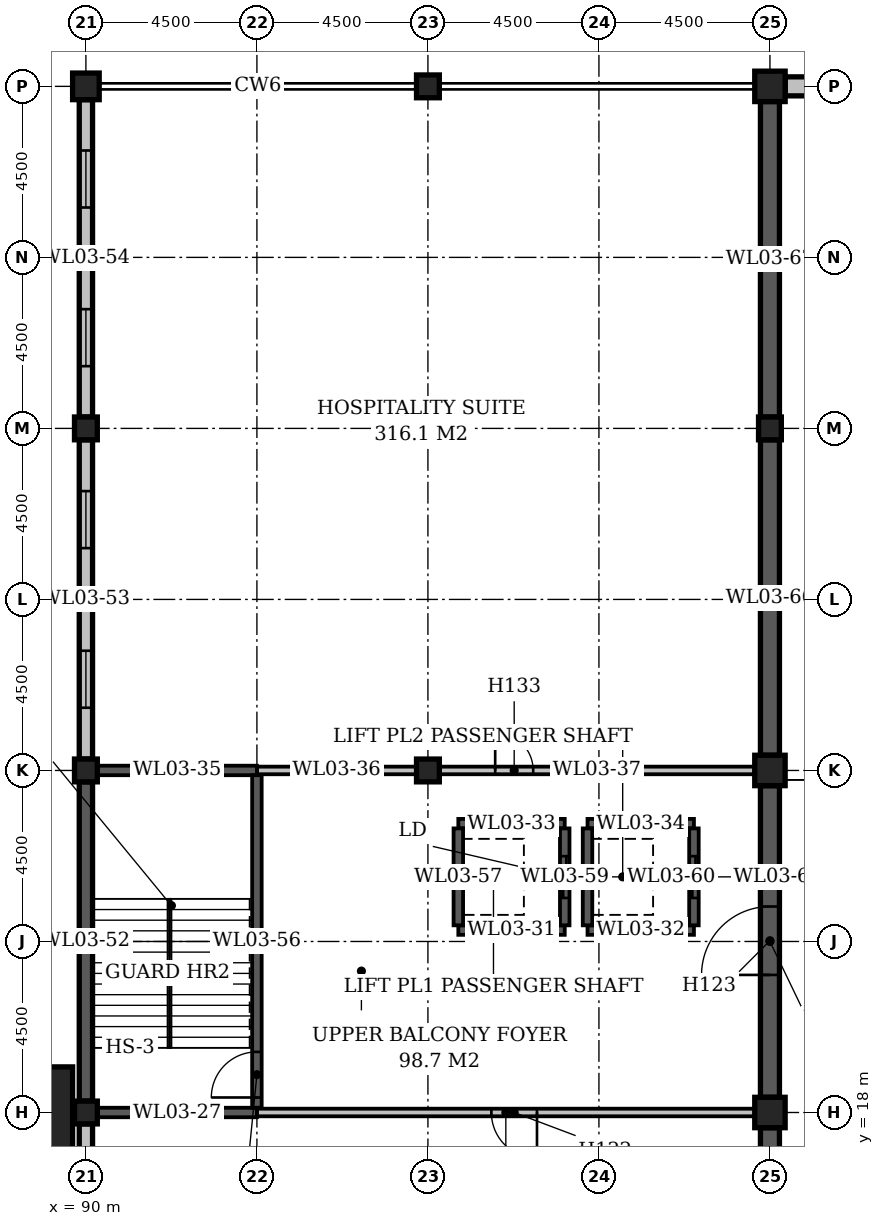
"""IFC4 building model, lengths in metres.
Left out: names, types, materials, properties, quantities, classifications, styles, units other than length and angle.
Written with IfcOpenShell. Run it as: python <this file> out.ifc"""

import sys

from ifc_helpers import new_model, si_unit, direction, frame, frame_2d, origin, origin_2d, place, context, subcontext, project, spatial, rectangle, extrude, element, fill, save


model = new_model("IFC4")
c1 = context("Model", 3, precision=1e-05, world=origin(), true_north=direction((0.0, 1.0)))
c2 = subcontext(c1, "Body", "Model", "MODEL_VIEW")
j1 = project(units=[si_unit("LENGTHUNIT", "METRE"), si_unit("PLANEANGLEUNIT", "RADIAN")], contexts=[c1])
p1 = place(None, origin())
s1 = spatial("IfcSite", under=j1, at=p1, CompositionType="ELEMENT")
p2 = place(p1, origin())
s2 = spatial("IfcBuilding", under=s1, at=p2, CompositionType="ELEMENT")
p3 = place(p2, frame((0.0, 0.0, 19.0)))
s3 = spatial("IfcBuildingStorey", under=s2, at=p3, CompositionType="ELEMENT", Elevation=19.0)
for number, where, z_axis, x_axis in (
    (1, (90.0, 18.0, 0.0), (0.0, 0.0, 1.0), (1.0, 0.0, 0.0)),
    (2, (90.0, 27.0, 0.0), (0.0, 0.0, 1.0), (1.0, 0.0, 0.0)),
    (3, (90.0, 36.0, 0.0), (0.0, 0.0, 1.0), (1.0, 0.0, 0.0)),
):
    element("IfcColumn", number, at=place(p3, frame(where, z_axis=z_axis, x_axis=x_axis)), inside=s3, PredefinedType="COLUMN", context=c2, shape_type="SweptSolid", body=[
        extrude(rectangle(XDim=0.6, YDim=0.6, at=origin_2d()), origin(), (0.0, 0.0, 1.0), 4.7),
    ])
p4 = place(p3, frame((90.0, 45.0, 0.0), z_axis=(0.0, 0.0, 1.0), x_axis=(1.0, 0.0, 0.0)))
e4 = element("IfcColumn", 4, at=p4, inside=s3, PredefinedType="COLUMN", context=c2, shape_type="SweptSolid", body=[
    extrude(rectangle(XDim=0.7, YDim=0.7, at=origin_2d()), origin(), (0.0, 0.0, 1.0), 4.7),
])
for number, where, z_axis, x_axis in (
    (5, (99.0, 27.0, 0.0), (0.0, 0.0, 1.0), (1.0, 0.0, 0.0)),
    (6, (99.0, 45.0, 0.0), (0.0, 0.0, 1.0), (1.0, 0.0, 0.0)),
):
    element("IfcColumn", number, at=place(p3, frame(where, z_axis=z_axis, x_axis=x_axis)), inside=s3, PredefinedType="COLUMN", context=c2, shape_type="SweptSolid", body=[
        extrude(rectangle(XDim=0.6, YDim=0.6, at=origin_2d()), origin(), (0.0, 0.0, 1.0), 4.7),
    ])
for number, where, z_axis, x_axis in (
    (7, (108.0, 18.0, -0.3), (0.0, 0.0, 1.0), (1.0, 0.0, 0.0)),
    (8, (108.0, 27.0, -0.3), (0.0, 0.0, 1.0), (1.0, 0.0, 0.0)),
):
    element("IfcColumn", number, at=place(p3, frame(where, z_axis=z_axis, x_axis=x_axis)), inside=s3, PredefinedType="COLUMN", context=c2, shape_type="SweptSolid", body=[
        extrude(rectangle(XDim=0.8, YDim=0.8, at=origin_2d()), origin(), (0.0, 0.0, 1.0), 5.0),
    ])
p5 = place(p3, frame((108.0, 36.0, -0.3), z_axis=(0.0, 0.0, 1.0), x_axis=(1.0, 0.0, 0.0)))
e9 = element("IfcColumn", 9, at=p5, inside=s3, PredefinedType="COLUMN", context=c2, shape_type="SweptSolid", body=[
    extrude(rectangle(XDim=0.6, YDim=0.6, at=origin_2d()), origin(), (0.0, 0.0, 1.0), 5.0),
])
p6 = place(p3, frame((108.0, 45.0, -0.3), z_axis=(0.0, 0.0, 1.0), x_axis=(1.0, 0.0, 0.0)))
e10 = element("IfcColumn", 10, at=p6, inside=s3, PredefinedType="COLUMN", context=c2, shape_type="SweptSolid", body=[
    extrude(rectangle(XDim=0.8, YDim=0.8, at=origin_2d()), origin(), (0.0, 0.0, 1.0), 5.0),
])
p7 = place(p3, frame((90.3, 18.0, 0.0), z_axis=(0.0, 0.0, 1.0), x_axis=(1.0, 0.0, 0.0)))
e11 = element("IfcWall", 11, at=p7, inside=s3, PredefinedType="STANDARD", context=c2, shape_type="SweptSolid", body=[
    extrude(rectangle(XDim=4.2, YDim=0.25, at=frame_2d((2.1, 0.0))), origin(), (0.0, 0.0, 1.0), 5.0),
])
p8 = place(p3, frame((94.5, 18.0, 0.0), z_axis=(0.0, 0.0, 1.0), x_axis=(1.0, 0.0, 0.0)))
e12 = element("IfcWall", 12, at=p8, inside=s3, PredefinedType="STANDARD", context=c2, shape_type="SweptSolid", body=[
    extrude(rectangle(XDim=13.1, YDim=0.2, at=frame_2d((6.55, 0.0))), origin(), (0.0, 0.0, 1.0), 3.3),
])
p9 = place(p8, frame((6.17, 0.0, 0.0)))
e13 = element("IfcOpeningElement", 13, at=p9, cuts=e12, PredefinedType="OPENING", context=c2, shape_type="SweptSolid", body=[
    extrude(rectangle(XDim=1.2, YDim=2.1, at=frame_2d((0.6, 1.05))), frame((0.0, 0.112, 0.0), z_axis=(0.0, -1.0, 0.0), x_axis=(1.0, 0.0, 0.0)), (0.0, 0.0, 1.0), 0.224),
])
for number, where, z_axis, x_axis in (
    (14, (99.8, 22.8, 0.0), (0.0, 0.0, 1.0), (1.0, 0.0, 0.0)),
    (15, (103.2, 22.8, 0.0), (0.0, 0.0, 1.0), (1.0, 0.0, 0.0)),
    (16, (99.8, 25.6, 0.0), (0.0, 0.0, 1.0), (1.0, 0.0, 0.0)),
    (17, (103.2, 25.6, 0.0), (0.0, 0.0, 1.0), (1.0, 0.0, 0.0)),
):
    element("IfcWall", number, at=place(p3, frame(where, z_axis=z_axis, x_axis=x_axis)), inside=s3, PredefinedType="STANDARD", context=c2, shape_type="SweptSolid", body=[
        extrude(rectangle(XDim=2.8, YDim=0.25, at=frame_2d((1.4, 0.0))), origin(), (0.0, 0.0, 1.0), 5.0),
    ])
p10 = place(p3, frame((90.3, 27.0, 0.0), z_axis=(0.0, 0.0, 1.0), x_axis=(1.0, 0.0, 0.0)))
e18 = element("IfcWall", 18, at=p10, inside=s3, PredefinedType="STANDARD", context=c2, shape_type="SweptSolid", body=[
    extrude(rectangle(XDim=4.2, YDim=0.25, at=frame_2d((2.1, 0.0))), origin(), (0.0, 0.0, 1.0), 5.0),
])
p11 = place(p3, frame((94.5, 27.0, 0.0), z_axis=(0.0, 0.0, 1.0), x_axis=(1.0, 0.0, 0.0)))
e19 = element("IfcWall", 19, at=p11, inside=s3, PredefinedType="STANDARD", context=c2, shape_type="SweptSolid", body=[
    extrude(rectangle(XDim=4.2, YDim=0.2, at=frame_2d((2.1, 0.0))), origin(), (0.0, 0.0, 1.0), 4.7),
])
p12 = place(p3, frame((99.3, 27.0, 0.0), z_axis=(0.0, 0.0, 1.0), x_axis=(1.0, 0.0, 0.0)))
e20 = element("IfcWall", 20, at=p12, inside=s3, PredefinedType="STANDARD", context=c2, shape_type="SweptSolid", body=[
    extrude(rectangle(XDim=8.3, YDim=0.2, at=frame_2d((4.15, 0.0))), origin(), (0.0, 0.0, 1.0), 4.7),
])
p13 = place(p12, frame((1.47, 0.0, 0.0)))
e21 = element("IfcOpeningElement", 21, at=p13, cuts=e20, PredefinedType="OPENING", context=c2, shape_type="SweptSolid", body=[
    extrude(rectangle(XDim=1.0, YDim=2.1, at=frame_2d((0.5, 1.05))), frame((0.0, 0.112, 0.0), z_axis=(0.0, -1.0, 0.0), x_axis=(1.0, 0.0, 0.0)), (0.0, 0.0, 1.0), 0.224),
])
p14 = place(p3, frame((108.4, 45.0, 0.0), z_axis=(0.0, 0.0, 1.0), x_axis=(1.0, 0.0, 0.0)))
e22 = element("IfcWall", 22, at=p14, inside=s3, PredefinedType="STANDARD", context=c2, shape_type="SweptSolid", body=[
    extrude(rectangle(XDim=8.3, YDim=0.5, at=frame_2d((4.15, 0.0))), origin(), (0.0, 0.0, 1.0), 5.0),
])
p15 = place(p3, frame((90.0, 9.3, 0.0), z_axis=(0.0, 0.0, 1.0), x_axis=(0.0, 1.0, 0.0)))
e23 = element("IfcWall", 23, at=p15, inside=s3, PredefinedType="STANDARD", context=c2, shape_type="SweptSolid", body=[
    extrude(rectangle(XDim=8.4, YDim=0.35, at=frame_2d((4.2, 0.0))), origin(), (0.0, 0.0, 1.0), 4.1),
])
p16 = place(p15, frame((1.35, 0.0, 1.0)))
e24 = element("IfcOpeningElement", 24, at=p16, cuts=e23, PredefinedType="OPENING", context=c2, shape_type="SweptSolid", body=[
    extrude(rectangle(XDim=1.5, YDim=2.4, at=frame_2d((0.75, 1.2))), frame((0.0, 0.187, 0.0), z_axis=(0.0, -1.0, 0.0), x_axis=(1.0, 0.0, 0.0)), (0.0, 0.0, 1.0), 0.374),
])
p17 = place(p15, frame((5.55, 0.0, 1.0)))
e25 = element("IfcOpeningElement", 25, at=p17, cuts=e23, PredefinedType="OPENING", context=c2, shape_type="SweptSolid", body=[
    extrude(rectangle(XDim=1.5, YDim=2.4, at=frame_2d((0.75, 1.2))), frame((0.0, 0.187, 0.0), z_axis=(0.0, -1.0, 0.0), x_axis=(1.0, 0.0, 0.0)), (0.0, 0.0, 1.0), 0.374),
])
p18 = place(p3, frame((90.0, 18.3, 0.0), z_axis=(0.0, 0.0, 1.0), x_axis=(0.0, 1.0, 0.0)))
e26 = element("IfcWall", 26, at=p18, inside=s3, PredefinedType="STANDARD", context=c2, shape_type="SweptSolid", body=[
    extrude(rectangle(XDim=8.4, YDim=0.35, at=frame_2d((4.2, 0.0))), origin(), (0.0, 0.0, 1.0), 5.0),
])
p19 = place(p3, frame((90.0, 27.3, 0.0), z_axis=(0.0, 0.0, 1.0), x_axis=(0.0, 1.0, 0.0)))
e27 = element("IfcWall", 27, at=p19, inside=s3, PredefinedType="STANDARD", context=c2, shape_type="SweptSolid", body=[
    extrude(rectangle(XDim=8.4, YDim=0.35, at=frame_2d((4.2, 0.0))), origin(), (0.0, 0.0, 1.0), 4.1),
])
p20 = place(p19, frame((1.35, 0.0, 1.0)))
e28 = element("IfcOpeningElement", 28, at=p20, cuts=e27, PredefinedType="OPENING", context=c2, shape_type="SweptSolid", body=[
    extrude(rectangle(XDim=1.5, YDim=2.4, at=frame_2d((0.75, 1.2))), frame((0.0, 0.187, 0.0), z_axis=(0.0, -1.0, 0.0), x_axis=(1.0, 0.0, 0.0)), (0.0, 0.0, 1.0), 0.374),
])
p21 = place(p19, frame((5.55, 0.0, 1.0)))
e29 = element("IfcOpeningElement", 29, at=p21, cuts=e27, PredefinedType="OPENING", context=c2, shape_type="SweptSolid", body=[
    extrude(rectangle(XDim=1.5, YDim=2.4, at=frame_2d((0.75, 1.2))), frame((0.0, 0.187, 0.0), z_axis=(0.0, -1.0, 0.0), x_axis=(1.0, 0.0, 0.0)), (0.0, 0.0, 1.0), 0.374),
])
p22 = place(p3, frame((90.0, 36.3, 0.0), z_axis=(0.0, 0.0, 1.0), x_axis=(0.0, 1.0, 0.0)))
e30 = element("IfcWall", 30, at=p22, inside=s3, PredefinedType="STANDARD", context=c2, shape_type="SweptSolid", body=[
    extrude(rectangle(XDim=8.35, YDim=0.35, at=frame_2d((4.175, 0.0))), origin(), (0.0, 0.0, 1.0), 4.1),
])
p23 = place(p22, frame((1.337, 0.0, 1.0)))
e31 = element("IfcOpeningElement", 31, at=p23, cuts=e30, PredefinedType="OPENING", context=c2, shape_type="SweptSolid", body=[
    extrude(rectangle(XDim=1.5, YDim=2.4, at=frame_2d((0.75, 1.2))), frame((0.0, 0.187, 0.0), z_axis=(0.0, -1.0, 0.0), x_axis=(1.0, 0.0, 0.0)), (0.0, 0.0, 1.0), 0.374),
])
p24 = place(p22, frame((5.512, 0.0, 1.0)))
e32 = element("IfcOpeningElement", 32, at=p24, cuts=e30, PredefinedType="OPENING", context=c2, shape_type="SweptSolid", body=[
    extrude(rectangle(XDim=1.5, YDim=2.4, at=frame_2d((0.75, 1.2))), frame((0.0, 0.187, 0.0), z_axis=(0.0, -1.0, 0.0), x_axis=(1.0, 0.0, 0.0)), (0.0, 0.0, 1.0), 0.374),
])
p25 = place(p3, frame((94.5, 18.125, 0.0), z_axis=(0.0, 0.0, 1.0), x_axis=(0.0, 1.0, 0.0)))
e33 = element("IfcWall", 33, at=p25, inside=s3, PredefinedType="STANDARD", context=c2, shape_type="SweptSolid", body=[
    extrude(rectangle(XDim=8.75, YDim=0.25, at=frame_2d((4.375, 0.0))), origin(), (0.0, 0.0, 1.0), 5.0),
])
p26 = place(p25, frame((0.27, 0.0, 0.0)))
e34 = element("IfcOpeningElement", 34, at=p26, cuts=e33, PredefinedType="OPENING", context=c2, shape_type="SweptSolid", body=[
    extrude(rectangle(XDim=1.2, YDim=2.1, at=frame_2d((0.6, 1.05))), frame((0.0, 0.137, 0.0), z_axis=(0.0, -1.0, 0.0), x_axis=(1.0, 0.0, 0.0)), (0.0, 0.0, 1.0), 0.274),
])
p27 = place(p3, frame((99.8, 22.925, 0.0), z_axis=(0.0, 0.0, 1.0), x_axis=(0.0, 1.0, 0.0)))
e35 = element("IfcWall", 35, at=p27, inside=s3, PredefinedType="STANDARD", context=c2, shape_type="SweptSolid", body=[
    extrude(rectangle(XDim=2.55, YDim=0.25, at=frame_2d((1.275, 0.0))), origin(), (0.0, 0.0, 1.0), 5.0),
])
p28 = place(p3, frame((102.6, 22.925, 0.0), z_axis=(0.0, 0.0, 1.0), x_axis=(0.0, 1.0, 0.0)))
e36 = element("IfcWall", 36, at=p28, inside=s3, PredefinedType="STANDARD", context=c2, shape_type="SweptSolid", body=[
    extrude(rectangle(XDim=2.55, YDim=0.25, at=frame_2d((1.275, 0.0))), origin(), (0.0, 0.0, 1.0), 5.0),
])
p29 = place(p28, frame((0.72, 0.0, 0.0)))
e37 = element("IfcOpeningElement", 37, at=p29, cuts=e36, PredefinedType="OPENING", context=c2, shape_type="SweptSolid", body=[
    extrude(rectangle(XDim=1.1, YDim=2.1, at=frame_2d((0.55, 1.05))), frame((0.0, 0.137, 0.0), z_axis=(0.0, -1.0, 0.0), x_axis=(1.0, 0.0, 0.0)), (0.0, 0.0, 1.0), 0.274),
])
p30 = place(p3, frame((103.2, 22.925, 0.0), z_axis=(0.0, 0.0, 1.0), x_axis=(0.0, 1.0, 0.0)))
e38 = element("IfcWall", 38, at=p30, inside=s3, PredefinedType="STANDARD", context=c2, shape_type="SweptSolid", body=[
    extrude(rectangle(XDim=2.55, YDim=0.25, at=frame_2d((1.275, 0.0))), origin(), (0.0, 0.0, 1.0), 5.0),
])
p31 = place(p3, frame((106.0, 22.925, 0.0), z_axis=(0.0, 0.0, 1.0), x_axis=(0.0, 1.0, 0.0)))
e39 = element("IfcWall", 39, at=p31, inside=s3, PredefinedType="STANDARD", context=c2, shape_type="SweptSolid", body=[
    extrude(rectangle(XDim=2.55, YDim=0.25, at=frame_2d((1.275, 0.0))), origin(), (0.0, 0.0, 1.0), 5.0),
])
p32 = place(p31, frame((0.72, 0.0, 0.0)))
e40 = element("IfcOpeningElement", 40, at=p32, cuts=e39, PredefinedType="OPENING", context=c2, shape_type="SweptSolid", body=[
    extrude(rectangle(XDim=1.1, YDim=2.1, at=frame_2d((0.55, 1.05))), frame((0.0, 0.137, 0.0), z_axis=(0.0, -1.0, 0.0), x_axis=(1.0, 0.0, 0.0)), (0.0, 0.0, 1.0), 0.274),
])
p33 = place(p3, frame((108.0, 9.4, 0.0), z_axis=(0.0, 0.0, 1.0), x_axis=(0.0, 1.0, 0.0)))
e41 = element("IfcWall", 41, at=p33, inside=s3, PredefinedType="STANDARD", context=c2, shape_type="SweptSolid", body=[
    extrude(rectangle(XDim=8.2, YDim=0.5, at=frame_2d((4.1, 0.0))), origin(), (0.0, 0.0, 1.0), 5.0),
])
p34 = place(p3, frame((108.0, 18.4, 0.0), z_axis=(0.0, 0.0, 1.0), x_axis=(0.0, 1.0, 0.0)))
e42 = element("IfcWall", 42, at=p34, inside=s3, PredefinedType="STANDARD", context=c2, shape_type="SweptSolid", body=[
    extrude(rectangle(XDim=8.2, YDim=0.5, at=frame_2d((4.1, 0.0))), origin(), (0.0, 0.0, 1.0), 5.0),
])
p35 = place(p34, frame((3.22, 0.0, 0.0)))
e43 = element("IfcOpeningElement", 43, at=p35, cuts=e42, PredefinedType="OPENING", context=c2, shape_type="SweptSolid", body=[
    extrude(rectangle(XDim=1.8, YDim=2.4, at=frame_2d((0.9, 1.2))), frame((0.0, 0.262, 0.0), z_axis=(0.0, -1.0, 0.0), x_axis=(1.0, 0.0, 0.0)), (0.0, 0.0, 1.0), 0.524),
])
for number, where, z_axis, x_axis in (
    (44, (108.0, 27.4, 0.0), (0.0, 0.0, 1.0), (0.0, 1.0, 0.0)),
    (45, (108.0, 36.3, 0.0), (0.0, 0.0, 1.0), (0.0, 1.0, 0.0)),
):
    element("IfcWall", number, at=place(p3, frame(where, z_axis=z_axis, x_axis=x_axis)), inside=s3, PredefinedType="STANDARD", context=c2, shape_type="SweptSolid", body=[
        extrude(rectangle(XDim=8.3, YDim=0.5, at=frame_2d((4.15, 0.0))), origin(), (0.0, 0.0, 1.0), 5.0),
    ])
p36 = place(p3, frame((88.85, 18.0, 0.0), z_axis=(0.0, 0.0, 1.0), x_axis=(1.0, 0.0, 0.0)))
e46 = element("IfcColumn", 46, at=p36, inside=s3, PredefinedType="COLUMN", context=c2, shape_type="SweptSolid", body=[
    extrude(rectangle(XDim=1.6, YDim=2.4, at=origin_2d()), origin(), (0.0, 0.0, 1.0), 5.0),
])
p37 = place(p9, origin())
e47 = element("IfcDoor", 47, at=p37, inside=s3, OperationType="SINGLE_SWING_RIGHT", PredefinedType="DOOR", context=c2, shape_type="SweptSolid", body=[
    extrude(rectangle(XDim=1.2, YDim=2.1, at=frame_2d((0.6, 1.05))), frame((0.0, 0.025, 0.0), z_axis=(0.0, -1.0, 0.0), x_axis=(1.0, 0.0, 0.0)), (0.0, 0.0, 1.0), 0.05),
])
fill(e13, e47)
p38 = place(p35, origin())
e48 = element("IfcDoor", 48, at=p38, inside=s3, OperationType="DOUBLE_DOOR_SINGLE_SWING", PredefinedType="DOOR", context=c2, shape_type="SweptSolid", body=[
    extrude(rectangle(XDim=1.8, YDim=2.4, at=frame_2d((0.9, 1.2))), frame((0.0, 0.025, 0.0), z_axis=(0.0, -1.0, 0.0), x_axis=(1.0, 0.0, 0.0)), (0.0, 0.0, 1.0), 0.05),
])
fill(e43, e48)
p39 = place(p26, origin())
e49 = element("IfcDoor", 49, at=p39, inside=s3, OperationType="SINGLE_SWING_LEFT", PredefinedType="DOOR", context=c2, shape_type="SweptSolid", body=[
    extrude(rectangle(XDim=1.2, YDim=2.1, at=frame_2d((0.6, 1.05))), frame((0.0, 0.025, 0.0), z_axis=(0.0, -1.0, 0.0), x_axis=(1.0, 0.0, 0.0)), (0.0, 0.0, 1.0), 0.05),
])
fill(e34, e49)
p40 = place(p13, origin())
e50 = element("IfcDoor", 50, at=p40, inside=s3, OperationType="SINGLE_SWING_LEFT", PredefinedType="DOOR", context=c2, shape_type="SweptSolid", body=[
    extrude(rectangle(XDim=1.0, YDim=2.1, at=frame_2d((0.5, 1.05))), frame((0.0, 0.025, 0.0), z_axis=(0.0, -1.0, 0.0), x_axis=(1.0, 0.0, 0.0)), (0.0, 0.0, 1.0), 0.05),
])
fill(e21, e50)
p41 = place(p29, origin())
e51 = element("IfcDoor", 51, at=p41, inside=s3, OperationType="SLIDING_TO_LEFT", PredefinedType="DOOR", context=c2, shape_type="SweptSolid", body=[
    extrude(rectangle(XDim=1.1, YDim=2.1, at=frame_2d((0.55, 1.05))), frame((0.0, 0.025, 0.0), z_axis=(0.0, -1.0, 0.0), x_axis=(1.0, 0.0, 0.0)), (0.0, 0.0, 1.0), 0.05),
])
fill(e37, e51)
p42 = place(p32, origin())
e52 = element("IfcDoor", 52, at=p42, inside=s3, OperationType="SLIDING_TO_LEFT", PredefinedType="DOOR", context=c2, shape_type="SweptSolid", body=[
    extrude(rectangle(XDim=1.1, YDim=2.1, at=frame_2d((0.55, 1.05))), frame((0.0, 0.025, 0.0), z_axis=(0.0, -1.0, 0.0), x_axis=(1.0, 0.0, 0.0)), (0.0, 0.0, 1.0), 0.05),
])
fill(e40, e52)
p43 = place(p20, origin())
e53 = element("IfcWindow", 53, at=p43, inside=s3, PartitioningType="SINGLE_PANEL", PredefinedType="WINDOW", context=c2, shape_type="SweptSolid", body=[
    extrude(rectangle(XDim=1.5, YDim=2.4, at=frame_2d((0.75, 1.2))), frame((0.0, 0.03, 0.0), z_axis=(0.0, -1.0, 0.0), x_axis=(1.0, 0.0, 0.0)), (0.0, 0.0, 1.0), 0.06),
])
fill(e28, e53)
p44 = place(p21, origin())
e54 = element("IfcWindow", 54, at=p44, inside=s3, PartitioningType="SINGLE_PANEL", PredefinedType="WINDOW", context=c2, shape_type="SweptSolid", body=[
    extrude(rectangle(XDim=1.5, YDim=2.4, at=frame_2d((0.75, 1.2))), frame((0.0, 0.03, 0.0), z_axis=(0.0, -1.0, 0.0), x_axis=(1.0, 0.0, 0.0)), (0.0, 0.0, 1.0), 0.06),
])
fill(e29, e54)
p45 = place(p23, origin())
e55 = element("IfcWindow", 55, at=p45, inside=s3, PartitioningType="SINGLE_PANEL", PredefinedType="WINDOW", context=c2, shape_type="SweptSolid", body=[
    extrude(rectangle(XDim=1.5, YDim=2.4, at=frame_2d((0.75, 1.2))), frame((0.0, 0.03, 0.0), z_axis=(0.0, -1.0, 0.0), x_axis=(1.0, 0.0, 0.0)), (0.0, 0.0, 1.0), 0.06),
])
fill(e31, e55)
p46 = place(p24, origin())
e56 = element("IfcWindow", 56, at=p46, inside=s3, PartitioningType="SINGLE_PANEL", PredefinedType="WINDOW", context=c2, shape_type="SweptSolid", body=[
    extrude(rectangle(XDim=1.5, YDim=2.4, at=frame_2d((0.75, 1.2))), frame((0.0, 0.03, 0.0), z_axis=(0.0, -1.0, 0.0), x_axis=(1.0, 0.0, 0.0)), (0.0, 0.0, 1.0), 0.06),
])
fill(e32, e56)
save(model, sys.argv[1])
